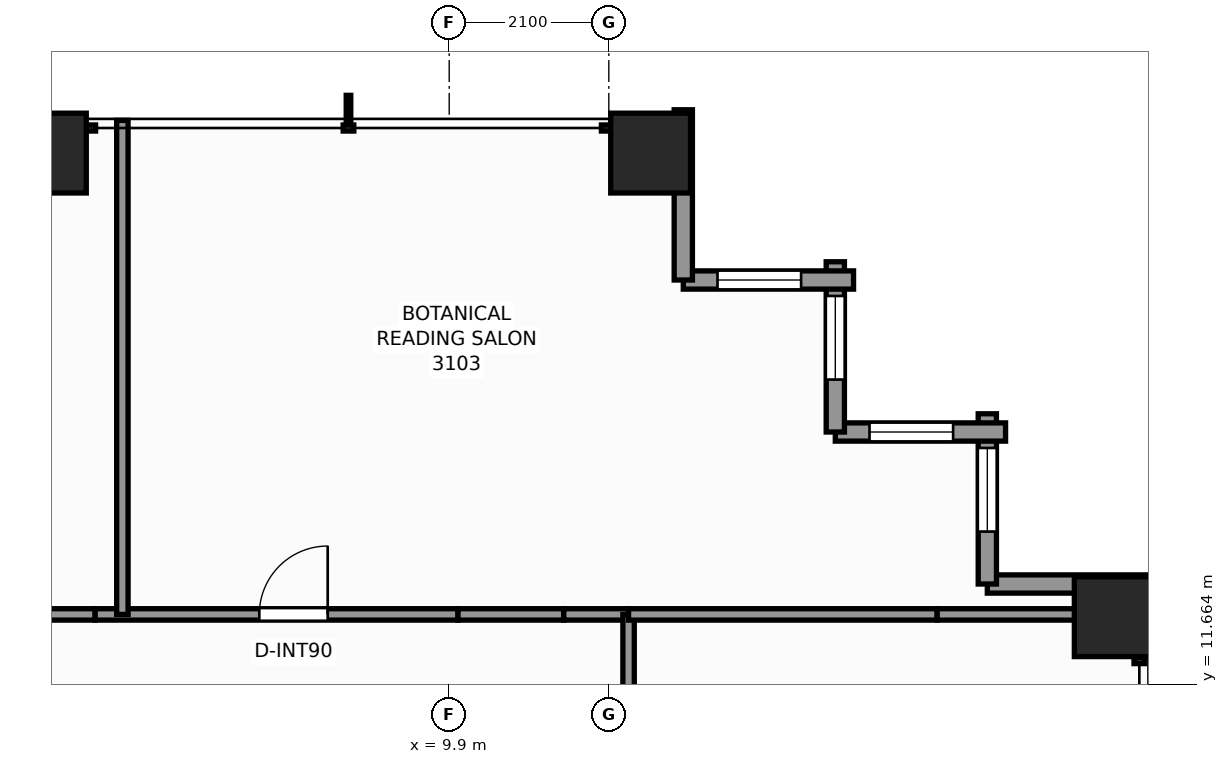
"""IFC4 building model, lengths in metres.
Left out: names, types, materials, properties, quantities, classifications, styles, units other than length and angle.
Written with IfcOpenShell. Run it as: python <this file> out.ifc"""

import sys

from ifc_helpers import new_model, si_unit, direction, frame, frame_2d, origin, origin_2d, place, context, subcontext, project, spatial, rectangle, extrude, element, fill, save


model = new_model("IFC4")
c1 = context("Model", 3, precision=1e-05, world=origin(), true_north=direction((0.0, 1.0)))
c2 = subcontext(c1, "Body", "Model", "MODEL_VIEW")
j1 = project(units=[si_unit("LENGTHUNIT", "METRE"), si_unit("PLANEANGLEUNIT", "RADIAN")], contexts=[c1])
p1 = place(None, origin())
s1 = spatial("IfcSite", under=j1, at=p1, CompositionType="ELEMENT")
p2 = place(p1, origin())
s2 = spatial("IfcBuilding", under=s1, at=p2, CompositionType="ELEMENT")
p3 = place(p2, frame((0.0, 0.0, 108.5)))
s3 = spatial("IfcBuildingStorey", under=s2, at=p3, CompositionType="ELEMENT", Elevation=108.5)
for number, where, z_axis, x_axis in (
    (1, (4.6, 18.65, 0.0), (0.0, 0.0, 1.0), (1.0, 0.0, 0.0)),
    (2, (12.55, 18.65, 0.0), (0.0, 0.0, 1.0), (1.0, 0.0, 0.0)),
    (3, (18.65, 12.55, 0.0), (0.0, 0.0, 1.0), (1.0, 0.0, 0.0)),
):
    element("IfcColumn", number, at=place(p3, frame(where, z_axis=z_axis, x_axis=x_axis)), inside=s3, PredefinedType="COLUMN", context=c2, shape_type="SweptSolid", body=[
        extrude(rectangle(XDim=1.05, YDim=1.05, at=origin_2d()), origin(), (0.0, 0.0, 1.0), 3.3),
    ])
p4 = place(p3, frame((16.98, 12.98, 0.0), z_axis=(0.0, 0.0, 1.0), x_axis=(1.0, 0.0, 0.0)))
e4 = element("IfcWall", 4, at=p4, inside=s3, PredefinedType="STANDARD", context=c2, shape_type="SweptSolid", body=[
    extrude(rectangle(XDim=2.24, YDim=0.24, at=frame_2d((1.12, 0.0))), origin(), (0.0, 0.0, 1.0), 1.275),
])
p5 = place(p3, frame((16.98, 15.22, 0.0), z_axis=(0.0, 0.0, 1.0), x_axis=(0.0, -1.0, 0.0)))
e5 = element("IfcWall", 5, at=p5, inside=s3, PredefinedType="STANDARD", context=c2, shape_type="SweptSolid", body=[
    extrude(rectangle(XDim=2.24, YDim=0.24, at=frame_2d((1.12, 0.0))), origin(), (0.0, 0.0, 1.0), 2.459),
])
p6 = place(p5, frame((0.45, 0.0, 0.65)))
e6 = element("IfcOpeningElement", 6, at=p6, cuts=e5, PredefinedType="OPENING", context=c2, shape_type="SweptSolid", body=[
    extrude(rectangle(XDim=1.1, YDim=1.45, at=frame_2d((0.55, 0.725))), frame((0.0, 0.13, 0.0), z_axis=(0.0, -1.0, 0.0), x_axis=(1.0, 0.0, 0.0)), (0.0, 0.0, 1.0), 0.26),
])
p7 = place(p3, frame((14.98, 14.98, 0.0), z_axis=(0.0, 0.0, 1.0), x_axis=(1.0, 0.0, 0.0)))
e7 = element("IfcWall", 7, at=p7, inside=s3, PredefinedType="STANDARD", context=c2, shape_type="SweptSolid", body=[
    extrude(rectangle(XDim=2.24, YDim=0.24, at=frame_2d((1.12, 0.0))), origin(), (0.0, 0.0, 1.0), 2.459),
])
p8 = place(p7, frame((0.45, 0.0, 0.65)))
e8 = element("IfcOpeningElement", 8, at=p8, cuts=e7, PredefinedType="OPENING", context=c2, shape_type="SweptSolid", body=[
    extrude(rectangle(XDim=1.1, YDim=1.45, at=frame_2d((0.55, 0.725))), frame((0.0, 0.13, 0.0), z_axis=(0.0, -1.0, 0.0), x_axis=(1.0, 0.0, 0.0)), (0.0, 0.0, 1.0), 0.26),
])
p9 = place(p3, frame((14.98, 17.22, 0.0), z_axis=(0.0, 0.0, 1.0), x_axis=(0.0, -1.0, 0.0)))
e9 = element("IfcWall", 9, at=p9, inside=s3, PredefinedType="STANDARD", context=c2, shape_type="SweptSolid", body=[
    extrude(rectangle(XDim=2.24, YDim=0.24, at=frame_2d((1.12, 0.0))), origin(), (0.0, 0.0, 1.0), 2.459),
])
p10 = place(p9, frame((0.45, 0.0, 0.65)))
e10 = element("IfcOpeningElement", 10, at=p10, cuts=e9, PredefinedType="OPENING", context=c2, shape_type="SweptSolid", body=[
    extrude(rectangle(XDim=1.1, YDim=1.45, at=frame_2d((0.55, 0.725))), frame((0.0, 0.13, 0.0), z_axis=(0.0, -1.0, 0.0), x_axis=(1.0, 0.0, 0.0)), (0.0, 0.0, 1.0), 0.26),
])
p11 = place(p3, frame((12.98, 16.98, 0.0), z_axis=(0.0, 0.0, 1.0), x_axis=(1.0, 0.0, 0.0)))
e11 = element("IfcWall", 11, at=p11, inside=s3, PredefinedType="STANDARD", context=c2, shape_type="SweptSolid", body=[
    extrude(rectangle(XDim=2.24, YDim=0.24, at=frame_2d((1.12, 0.0))), origin(), (0.0, 0.0, 1.0), 2.459),
])
p12 = place(p11, frame((0.45, 0.0, 0.65)))
e12 = element("IfcOpeningElement", 12, at=p12, cuts=e11, PredefinedType="OPENING", context=c2, shape_type="SweptSolid", body=[
    extrude(rectangle(XDim=1.1, YDim=1.45, at=frame_2d((0.55, 0.725))), frame((0.0, 0.13, 0.0), z_axis=(0.0, -1.0, 0.0), x_axis=(1.0, 0.0, 0.0)), (0.0, 0.0, 1.0), 0.26),
])
p13 = place(p3, frame((12.98, 19.22, 0.0), z_axis=(0.0, 0.0, 1.0), x_axis=(0.0, -1.0, 0.0)))
e13 = element("IfcWall", 13, at=p13, inside=s3, PredefinedType="STANDARD", context=c2, shape_type="SweptSolid", body=[
    extrude(rectangle(XDim=2.24, YDim=0.24, at=frame_2d((1.12, 0.0))), origin(), (0.0, 0.0, 1.0), 1.275),
])
p14 = place(p3, frame((3.958, 12.58, 0.0), z_axis=(0.0, 0.0, 1.0), x_axis=(1.0, 0.0, 0.0)))
e14 = element("IfcWall", 14, at=p14, inside=s3, PredefinedType="PARTITIONING", context=c2, shape_type="SweptSolid", body=[
    extrude(rectangle(XDim=1.284, YDim=0.15, at=frame_2d((0.642, 0.0))), origin(), (0.0, 0.0, 1.0), 1.265),
])
p15 = place(p3, frame((5.242, 12.58, 0.0), z_axis=(0.0, 0.0, 1.0), x_axis=(1.0, 0.0, 0.0)))
e15 = element("IfcWall", 15, at=p15, inside=s3, PredefinedType="PARTITIONING", context=c2, shape_type="SweptSolid", body=[
    extrude(rectangle(XDim=4.774, YDim=0.15, at=frame_2d((2.387, 0.0))), origin(), (0.0, 0.0, 1.0), 3.08),
])
p16 = place(p15, frame((2.159, 0.0, 0.0)))
e16 = element("IfcOpeningElement", 16, at=p16, cuts=e15, PredefinedType="OPENING", context=c2, shape_type="SweptSolid", body=[
    extrude(rectangle(XDim=0.9, YDim=2.06, at=frame_2d((0.45, 1.03))), frame((0.0, 0.085, 0.0), z_axis=(0.0, -1.0, 0.0), x_axis=(1.0, 0.0, 0.0)), (0.0, 0.0, 1.0), 0.17),
])
p17 = place(p3, frame((10.016, 12.58, 0.0), z_axis=(0.0, 0.0, 1.0), x_axis=(1.0, 0.0, 0.0)))
e17 = element("IfcWall", 17, at=p17, inside=s3, PredefinedType="PARTITIONING", context=c2, shape_type="SweptSolid", body=[
    extrude(rectangle(XDim=1.392, YDim=0.15, at=frame_2d((0.696, 0.0))), origin(), (0.0, 0.0, 1.0), 1.265),
])
p18 = place(p3, frame((11.407, 12.58, 0.0), z_axis=(0.0, 0.0, 1.0), x_axis=(1.0, 0.0, 0.0)))
e18 = element("IfcWall", 18, at=p18, inside=s3, PredefinedType="PARTITIONING", context=c2, shape_type="SweptSolid", body=[
    extrude(rectangle(XDim=0.853, YDim=0.15, at=frame_2d((0.426, 0.0))), origin(), (0.0, 0.0, 1.0), 3.08),
])
p19 = place(p3, frame((12.26, 11.311, 0.0), z_axis=(0.0, 0.0, 1.0), x_axis=(0.0, 1.0, 0.0)))
e19 = element("IfcWall", 19, at=p19, inside=s3, PredefinedType="PARTITIONING", context=c2, shape_type="SweptSolid", body=[
    extrude(rectangle(XDim=1.27, YDim=0.15, at=frame_2d((0.635, 0.0))), origin(), (0.0, 0.0, 1.0), 3.08),
])
p20 = place(p3, frame((12.26, 12.58, 0.0), z_axis=(0.0, 0.0, 1.0), x_axis=(1.0, 0.0, 0.0)))
e20 = element("IfcWall", 20, at=p20, inside=s3, PredefinedType="PARTITIONING", context=c2, shape_type="SweptSolid", body=[
    extrude(rectangle(XDim=4.061, YDim=0.15, at=frame_2d((2.03, 0.0))), origin(), (0.0, 0.0, 1.0), 3.08),
])
p21 = place(p3, frame((16.321, 12.58, 0.0), z_axis=(0.0, 0.0, 1.0), x_axis=(1.0, 0.0, 0.0)))
e21 = element("IfcWall", 21, at=p21, inside=s3, PredefinedType="PARTITIONING", context=c2, shape_type="SweptSolid", body=[
    extrude(rectangle(XDim=2.157, YDim=0.15, at=frame_2d((1.079, 0.0))), origin(), (0.0, 0.0, 1.0), 1.265),
])
p22 = place(p3, frame((18.478, 12.58, 0.0), z_axis=(0.0, 0.0, 1.0), x_axis=(1.0, 0.0, 0.0)))
e22 = element("IfcWall", 22, at=p22, inside=s3, PredefinedType="PARTITIONING", context=c2, shape_type="SweptSolid", body=[
    extrude(rectangle(XDim=0.602, YDim=0.15, at=frame_2d((0.301, 0.0))), origin(), (0.0, 0.0, 1.0), 3.08),
])
p23 = place(p3, frame((5.6, 12.58, 0.0), z_axis=(0.0, 0.0, 1.0), x_axis=(0.0, 1.0, 0.0)))
e23 = element("IfcWall", 23, at=p23, inside=s3, PredefinedType="PARTITIONING", context=c2, shape_type="SweptSolid", body=[
    extrude(rectangle(XDim=6.5, YDim=0.15, at=frame_2d((3.25, 0.0))), origin(), (0.0, 0.0, 1.0), 2.449),
])
p24 = place(p6, origin())
e24 = element("IfcWindow", 24, at=p24, inside=s3, PartitioningType="SINGLE_PANEL", PredefinedType="WINDOW", context=c2, shape_type="SweptSolid", body=[
    extrude(rectangle(XDim=1.1, YDim=1.45, at=frame_2d((0.55, 0.725))), frame((0.0, 0.03, 0.0), z_axis=(0.0, -1.0, 0.0), x_axis=(1.0, 0.0, 0.0)), (0.0, 0.0, 1.0), 0.06),
])
fill(e6, e24)
p25 = place(p8, origin())
e25 = element("IfcWindow", 25, at=p25, inside=s3, PartitioningType="SINGLE_PANEL", PredefinedType="WINDOW", context=c2, shape_type="SweptSolid", body=[
    extrude(rectangle(XDim=1.1, YDim=1.45, at=frame_2d((0.55, 0.725))), frame((0.0, 0.03, 0.0), z_axis=(0.0, -1.0, 0.0), x_axis=(1.0, 0.0, 0.0)), (0.0, 0.0, 1.0), 0.06),
])
fill(e8, e25)
p26 = place(p10, origin())
e26 = element("IfcWindow", 26, at=p26, inside=s3, PartitioningType="SINGLE_PANEL", PredefinedType="WINDOW", context=c2, shape_type="SweptSolid", body=[
    extrude(rectangle(XDim=1.1, YDim=1.45, at=frame_2d((0.55, 0.725))), frame((0.0, 0.03, 0.0), z_axis=(0.0, -1.0, 0.0), x_axis=(1.0, 0.0, 0.0)), (0.0, 0.0, 1.0), 0.06),
])
fill(e10, e26)
p27 = place(p12, origin())
e27 = element("IfcWindow", 27, at=p27, inside=s3, PartitioningType="SINGLE_PANEL", PredefinedType="WINDOW", context=c2, shape_type="SweptSolid", body=[
    extrude(rectangle(XDim=1.1, YDim=1.45, at=frame_2d((0.55, 0.725))), frame((0.0, 0.03, 0.0), z_axis=(0.0, -1.0, 0.0), x_axis=(1.0, 0.0, 0.0)), (0.0, 0.0, 1.0), 0.06),
])
fill(e12, e27)
p28 = place(p16, origin())
e28 = element("IfcDoor", 28, at=p28, inside=s3, OperationType="SINGLE_SWING_RIGHT", PredefinedType="DOOR", context=c2, shape_type="SweptSolid", body=[
    extrude(rectangle(XDim=0.9, YDim=2.06, at=frame_2d((0.45, 1.03))), frame((0.0, 0.025, 0.0), z_axis=(0.0, -1.0, 0.0), x_axis=(1.0, 0.0, 0.0)), (0.0, 0.0, 1.0), 0.05),
])
fill(e16, e28)
save(model, sys.argv[1])
